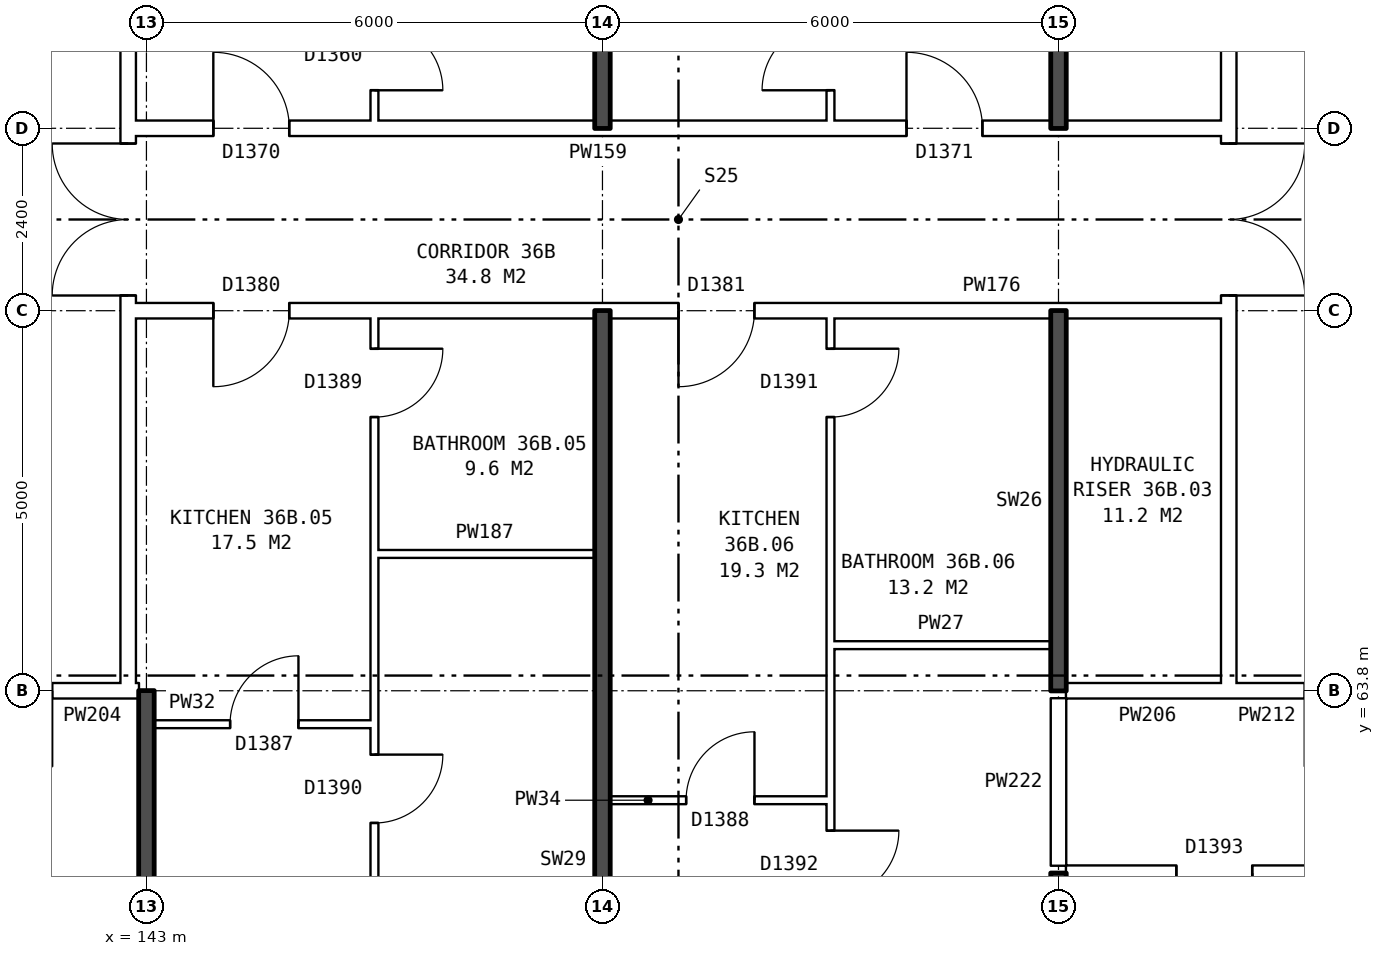
"""IFC4 building model, lengths in metres.
Left out: names, types, materials, properties, quantities, classifications, styles, units other than length and angle.
Written with IfcOpenShell. Run it as: python <this file> out.ifc"""

import sys

from ifc_helpers import new_model, si_unit, direction, frame, frame_2d, origin, place, context, subcontext, project, spatial, rectangle, extrude, element, fill, save


model = new_model("IFC4")
c1 = context("Model", 3, precision=1e-05, world=origin(), true_north=direction((0.0, 1.0)))
c2 = subcontext(c1, "Body", "Model", "MODEL_VIEW")
j1 = project(units=[si_unit("LENGTHUNIT", "METRE"), si_unit("PLANEANGLEUNIT", "RADIAN")], contexts=[c1])
p1 = place(None, origin())
s1 = spatial("IfcSite", under=j1, at=p1, CompositionType="ELEMENT")
p2 = place(p1, origin())
s2 = spatial("IfcBuilding", under=s1, at=p2, CompositionType="ELEMENT")
p3 = place(p2, frame((0.0, 0.0, 129.9)))
s3 = spatial("IfcBuildingStorey", under=s2, at=p3, CompositionType="ELEMENT", Elevation=129.9)
p4 = place(p3, frame((142.76, 63.9, 0.0), z_axis=(0.0, 0.0, 1.0), x_axis=(0.0, 1.0, 0.0)))
e1 = element("IfcWall", 1, at=p4, inside=s3, PredefinedType="PARTITIONING", context=c2, shape_type="SweptSolid", body=[
    extrude(rectangle(XDim=12.2, YDim=0.2, at=frame_2d((6.1, 0.0))), origin(), (0.0, 0.0, 1.0), 2.85),
])
p5 = place(p4, frame((5.1, 0.0, 0.0)))
e2 = element("IfcOpeningElement", 2, at=p5, cuts=e1, PredefinedType="OPENING", context=c2, shape_type="SweptSolid", body=[
    extrude(rectangle(XDim=2.0, YDim=2.1, at=frame_2d((1.0, 1.05))), frame((0.0, 0.11, 0.0), z_axis=(0.0, -1.0, 0.0), x_axis=(1.0, 0.0, 0.0)), (0.0, 0.0, 1.0), 0.22),
])
p6 = place(p3, frame((157.24, 63.9, 0.0), z_axis=(0.0, 0.0, 1.0), x_axis=(0.0, 1.0, 0.0)))
e3 = element("IfcWall", 3, at=p6, inside=s3, PredefinedType="PARTITIONING", context=c2, shape_type="SweptSolid", body=[
    extrude(rectangle(XDim=12.2, YDim=0.2, at=frame_2d((6.1, 0.0))), origin(), (0.0, 0.0, 1.0), 2.85),
])
p7 = place(p6, frame((5.1, 0.0, 0.0)))
e4 = element("IfcOpeningElement", 4, at=p7, cuts=e3, PredefinedType="OPENING", context=c2, shape_type="SweptSolid", body=[
    extrude(rectangle(XDim=2.0, YDim=2.1, at=frame_2d((1.0, 1.05))), frame((0.0, 0.11, 0.0), z_axis=(0.0, -1.0, 0.0), x_axis=(1.0, 0.0, 0.0)), (0.0, 0.0, 1.0), 0.22),
])
p8 = place(p3, frame((155.1, 61.4, 0.0), z_axis=(0.0, 0.0, 1.0), x_axis=(1.0, 0.0, 0.0)))
e5 = element("IfcWall", 5, at=p8, inside=s3, PredefinedType="PARTITIONING", context=c2, shape_type="SweptSolid", body=[
    extrude(rectangle(XDim=17.29, YDim=0.2, at=frame_2d((8.645, 0.0))), origin(), (0.0, 0.0, 1.0), 2.85),
])
p9 = place(p8, frame((1.45, 0.0, 0.0)))
e6 = element("IfcOpeningElement", 6, at=p9, cuts=e5, PredefinedType="OPENING", context=c2, shape_type="SweptSolid", body=[
    extrude(rectangle(XDim=1.0, YDim=2.1, at=frame_2d((0.5, 1.05))), frame((0.0, 0.11, 0.0), z_axis=(0.0, -1.0, 0.0), x_axis=(1.0, 0.0, 0.0)), (0.0, 0.0, 1.0), 0.22),
])
p10 = place(p8, frame((8.4, 0.0, 0.0)))
e7 = element("IfcOpeningElement", 7, at=p10, cuts=e5, PredefinedType="OPENING", context=c2, shape_type="SweptSolid", body=[
    extrude(rectangle(XDim=1.0, YDim=2.1, at=frame_2d((0.5, 1.05))), frame((0.0, 0.11, 0.0), z_axis=(0.0, -1.0, 0.0), x_axis=(1.0, 0.0, 0.0)), (0.0, 0.0, 1.0), 0.22),
])
p11 = place(p3, frame((149.1, 62.36, 0.0), z_axis=(0.0, 0.0, 1.0), x_axis=(1.0, 0.0, 0.0)))
e8 = element("IfcWall", 8, at=p11, inside=s3, PredefinedType="PARTITIONING", context=c2, shape_type="SweptSolid", body=[
    extrude(rectangle(XDim=2.9, YDim=0.1, at=frame_2d((1.45, 0.0))), origin(), (0.0, 0.0, 1.0), 2.85),
])
p12 = place(p11, frame((1.0, 0.0, 0.0)))
e9 = element("IfcOpeningElement", 9, at=p12, cuts=e8, PredefinedType="OPENING", context=c2, shape_type="SweptSolid", body=[
    extrude(rectangle(XDim=0.9, YDim=2.1, at=frame_2d((0.45, 1.05))), frame((0.0, 0.06, 0.0), z_axis=(0.0, -1.0, 0.0), x_axis=(1.0, 0.0, 0.0)), (0.0, 0.0, 1.0), 0.12),
])
p13 = place(p3, frame((143.1, 63.36, 0.0), z_axis=(0.0, 0.0, 1.0), x_axis=(1.0, 0.0, 0.0)))
e10 = element("IfcWall", 10, at=p13, inside=s3, PredefinedType="PARTITIONING", context=c2, shape_type="SweptSolid", body=[
    extrude(rectangle(XDim=2.9, YDim=0.1, at=frame_2d((1.45, 0.0))), origin(), (0.0, 0.0, 1.0), 2.85),
])
p14 = place(p13, frame((1.0, 0.0, 0.0)))
e11 = element("IfcOpeningElement", 11, at=p14, cuts=e10, PredefinedType="OPENING", context=c2, shape_type="SweptSolid", body=[
    extrude(rectangle(XDim=0.9, YDim=2.1, at=frame_2d((0.45, 1.05))), frame((0.0, 0.06, 0.0), z_axis=(0.0, -1.0, 0.0), x_axis=(1.0, 0.0, 0.0)), (0.0, 0.0, 1.0), 0.12),
])
p15 = place(p3, frame((139.76, 63.8, 0.0), z_axis=(0.0, 0.0, 1.0), x_axis=(1.0, 0.0, 0.0)))
e12 = element("IfcWall", 12, at=p15, inside=s3, PredefinedType="PARTITIONING", context=c2, shape_type="SweptSolid", body=[
    extrude(rectangle(XDim=3.0, YDim=0.2, at=frame_2d((1.5, 0.0))), origin(), (0.0, 0.0, 1.0), 2.85),
])
p16 = place(p15, frame((1.0, 0.0, 0.0)))
e13 = element("IfcOpeningElement", 13, at=p16, cuts=e12, PredefinedType="OPENING", context=c2, shape_type="SweptSolid", body=[
    extrude(rectangle(XDim=1.0, YDim=2.1, at=frame_2d((0.5, 1.05))), frame((0.0, 0.11, 0.0), z_axis=(0.0, -1.0, 0.0), x_axis=(1.0, 0.0, 0.0)), (0.0, 0.0, 1.0), 0.22),
])
p17 = place(p3, frame((142.76, 63.8, 0.0), z_axis=(0.0, 0.0, 1.0), x_axis=(1.0, 0.0, 0.0)))
e14 = element("IfcWall", 14, at=p17, inside=s3, PredefinedType="PARTITIONING", context=c2, shape_type="SweptSolid", body=[
    extrude(rectangle(XDim=0.14, YDim=0.2, at=frame_2d((0.07, 0.0))), origin(), (0.0, 0.0, 1.0), 2.85),
])
p18 = place(p3, frame((155.1, 63.8, 0.0), z_axis=(0.0, 0.0, 1.0), x_axis=(1.0, 0.0, 0.0)))
e15 = element("IfcWall", 15, at=p18, inside=s3, PredefinedType="PARTITIONING", context=c2, shape_type="SweptSolid", body=[
    extrude(rectangle(XDim=2.14, YDim=0.2, at=frame_2d((1.07, 0.0))), origin(), (0.0, 0.0, 1.0), 2.85),
])
p19 = place(p3, frame((157.24, 63.8, 0.0), z_axis=(0.0, 0.0, 1.0), x_axis=(1.0, 0.0, 0.0)))
e16 = element("IfcWall", 16, at=p19, inside=s3, PredefinedType="PARTITIONING", context=c2, shape_type="SweptSolid", body=[
    extrude(rectangle(XDim=3.0, YDim=0.2, at=frame_2d((1.5, 0.0))), origin(), (0.0, 0.0, 1.0), 2.85),
])
p20 = place(p19, frame((1.0, 0.0, 0.0)))
e17 = element("IfcOpeningElement", 17, at=p20, cuts=e16, PredefinedType="OPENING", context=c2, shape_type="SweptSolid", body=[
    extrude(rectangle(XDim=1.0, YDim=2.1, at=frame_2d((0.5, 1.05))), frame((0.0, 0.11, 0.0), z_axis=(0.0, -1.0, 0.0), x_axis=(1.0, 0.0, 0.0)), (0.0, 0.0, 1.0), 0.22),
])
for number, where, z_axis, x_axis in (
    (18, (152.0, 64.4, 0.0), (0.0, 0.0, 1.0), (1.0, 0.0, 0.0)),
    (19, (146.0, 65.6, 0.0), (0.0, 0.0, 1.0), (1.0, 0.0, 0.0)),
):
    element("IfcWall", number, at=place(p3, frame(where, z_axis=z_axis, x_axis=x_axis)), inside=s3, PredefinedType="PARTITIONING", context=c2, shape_type="SweptSolid", body=[
        extrude(rectangle(XDim=2.9, YDim=0.1, at=frame_2d((1.45, 0.0))), origin(), (0.0, 0.0, 1.0), 2.85),
    ])
p21 = place(p3, frame((142.76, 68.8, 0.0), z_axis=(0.0, 0.0, 1.0), x_axis=(1.0, 0.0, 0.0)))
e20 = element("IfcWall", 20, at=p21, inside=s3, PredefinedType="PARTITIONING", context=c2, shape_type="SweptSolid", body=[
    extrude(rectangle(XDim=14.48, YDim=0.2, at=frame_2d((7.24, 0.0))), origin(), (0.0, 0.0, 1.0), 2.85),
])
p22 = place(p21, frame((1.12, 0.0, 0.0)))
e21 = element("IfcOpeningElement", 21, at=p22, cuts=e20, PredefinedType="OPENING", context=c2, shape_type="SweptSolid", body=[
    extrude(rectangle(XDim=1.0, YDim=2.1, at=frame_2d((0.5, 1.05))), frame((0.0, 0.11, 0.0), z_axis=(0.0, -1.0, 0.0), x_axis=(1.0, 0.0, 0.0)), (0.0, 0.0, 1.0), 0.22),
])
p23 = place(p21, frame((7.24, 0.0, 0.0)))
e22 = element("IfcOpeningElement", 22, at=p23, cuts=e20, PredefinedType="OPENING", context=c2, shape_type="SweptSolid", body=[
    extrude(rectangle(XDim=1.0, YDim=2.1, at=frame_2d((0.5, 1.05))), frame((0.0, 0.11, 0.0), z_axis=(0.0, -1.0, 0.0), x_axis=(1.0, 0.0, 0.0)), (0.0, 0.0, 1.0), 0.22),
])
p24 = place(p3, frame((142.76, 71.2, 0.0), z_axis=(0.0, 0.0, 1.0), x_axis=(1.0, 0.0, 0.0)))
e23 = element("IfcWall", 23, at=p24, inside=s3, PredefinedType="PARTITIONING", context=c2, shape_type="SweptSolid", body=[
    extrude(rectangle(XDim=14.48, YDim=0.2, at=frame_2d((7.24, 0.0))), origin(), (0.0, 0.0, 1.0), 2.85),
])
p25 = place(p24, frame((1.12, 0.0, 0.0)))
e24 = element("IfcOpeningElement", 24, at=p25, cuts=e23, PredefinedType="OPENING", context=c2, shape_type="SweptSolid", body=[
    extrude(rectangle(XDim=1.0, YDim=2.1, at=frame_2d((0.5, 1.05))), frame((0.0, 0.11, 0.0), z_axis=(0.0, -1.0, 0.0), x_axis=(1.0, 0.0, 0.0)), (0.0, 0.0, 1.0), 0.22),
])
p26 = place(p24, frame((10.24, 0.0, 0.0)))
e25 = element("IfcOpeningElement", 25, at=p26, cuts=e23, PredefinedType="OPENING", context=c2, shape_type="SweptSolid", body=[
    extrude(rectangle(XDim=1.0, YDim=2.1, at=frame_2d((0.5, 1.05))), frame((0.0, 0.11, 0.0), z_axis=(0.0, -1.0, 0.0), x_axis=(1.0, 0.0, 0.0)), (0.0, 0.0, 1.0), 0.22),
])
p27 = place(p3, frame((143.0, 54.36, 0.0), z_axis=(0.0, 0.0, 1.0), x_axis=(0.0, 1.0, 0.0)))
e26 = element("IfcWall", 26, at=p27, inside=s3, PredefinedType="SOLIDWALL", context=c2, shape_type="SweptSolid", body=[
    extrude(rectangle(XDim=9.44, YDim=0.2, at=frame_2d((4.72, 0.0))), origin(), (0.0, 0.0, 1.0), 2.85),
])
p28 = place(p3, frame((146.0, 54.36, 0.0), z_axis=(0.0, 0.0, 1.0), x_axis=(0.0, 1.0, 0.0)))
e27 = element("IfcWall", 27, at=p28, inside=s3, PredefinedType="PARTITIONING", context=c2, shape_type="SweptSolid", body=[
    extrude(rectangle(XDim=14.34, YDim=0.1, at=frame_2d((7.17, 0.0))), origin(), (0.0, 0.0, 1.0), 2.85),
])
p29 = place(p28, frame((7.7, 0.0, 0.0)))
e28 = element("IfcOpeningElement", 28, at=p29, cuts=e27, PredefinedType="OPENING", context=c2, shape_type="SweptSolid", body=[
    extrude(rectangle(XDim=0.9, YDim=2.1, at=frame_2d((0.45, 1.05))), frame((0.0, 0.06, 0.0), z_axis=(0.0, -1.0, 0.0), x_axis=(1.0, 0.0, 0.0)), (0.0, 0.0, 1.0), 0.12),
])
p30 = place(p28, frame((13.04, 0.0, 0.0)))
e29 = element("IfcOpeningElement", 29, at=p30, cuts=e27, PredefinedType="OPENING", context=c2, shape_type="SweptSolid", body=[
    extrude(rectangle(XDim=0.9, YDim=2.1, at=frame_2d((0.45, 1.05))), frame((0.0, 0.06, 0.0), z_axis=(0.0, -1.0, 0.0), x_axis=(1.0, 0.0, 0.0)), (0.0, 0.0, 1.0), 0.12),
])
p31 = place(p3, frame((146.0, 71.3, 0.0), z_axis=(0.0, 0.0, 1.0), x_axis=(0.0, 1.0, 0.0)))
e30 = element("IfcWall", 30, at=p31, inside=s3, PredefinedType="PARTITIONING", context=c2, shape_type="SweptSolid", body=[
    extrude(rectangle(XDim=14.34, YDim=0.1, at=frame_2d((7.17, 0.0))), origin(), (0.0, 0.0, 1.0), 2.85),
])
p32 = place(p31, frame((6.74, 0.0, 0.0)))
e31 = element("IfcOpeningElement", 31, at=p32, cuts=e30, PredefinedType="OPENING", context=c2, shape_type="SweptSolid", body=[
    extrude(rectangle(XDim=0.9, YDim=2.1, at=frame_2d((0.45, 1.05))), frame((0.0, 0.06, 0.0), z_axis=(0.0, -1.0, 0.0), x_axis=(1.0, 0.0, 0.0)), (0.0, 0.0, 1.0), 0.12),
])
p33 = place(p31, frame((0.4, 0.0, 0.0)))
e32 = element("IfcOpeningElement", 32, at=p33, cuts=e30, PredefinedType="OPENING", context=c2, shape_type="SweptSolid", body=[
    extrude(rectangle(XDim=0.9, YDim=2.1, at=frame_2d((0.45, 1.05))), frame((0.0, 0.06, 0.0), z_axis=(0.0, -1.0, 0.0), x_axis=(1.0, 0.0, 0.0)), (0.0, 0.0, 1.0), 0.12),
])
for number, where, z_axis, x_axis in (
    (33, (149.0, 54.36, 0.0), (0.0, 0.0, 1.0), (0.0, 1.0, 0.0)),
    (34, (149.0, 71.2, 0.0), (0.0, 0.0, 1.0), (0.0, 1.0, 0.0)),
):
    element("IfcWall", number, at=place(p3, frame(where, z_axis=z_axis, x_axis=x_axis)), inside=s3, PredefinedType="SOLIDWALL", context=c2, shape_type="SweptSolid", body=[
        extrude(rectangle(XDim=14.44, YDim=0.2, at=frame_2d((7.22, 0.0))), origin(), (0.0, 0.0, 1.0), 2.85),
    ])
p34 = place(p3, frame((152.0, 54.36, 0.0), z_axis=(0.0, 0.0, 1.0), x_axis=(0.0, 1.0, 0.0)))
e35 = element("IfcWall", 35, at=p34, inside=s3, PredefinedType="PARTITIONING", context=c2, shape_type="SweptSolid", body=[
    extrude(rectangle(XDim=14.34, YDim=0.1, at=frame_2d((7.17, 0.0))), origin(), (0.0, 0.0, 1.0), 2.85),
])
p35 = place(p34, frame((6.7, 0.0, 0.0)))
e36 = element("IfcOpeningElement", 36, at=p35, cuts=e35, PredefinedType="OPENING", context=c2, shape_type="SweptSolid", body=[
    extrude(rectangle(XDim=0.9, YDim=2.1, at=frame_2d((0.45, 1.05))), frame((0.0, 0.06, 0.0), z_axis=(0.0, -1.0, 0.0), x_axis=(1.0, 0.0, 0.0)), (0.0, 0.0, 1.0), 0.12),
])
p36 = place(p34, frame((13.04, 0.0, 0.0)))
e37 = element("IfcOpeningElement", 37, at=p36, cuts=e35, PredefinedType="OPENING", context=c2, shape_type="SweptSolid", body=[
    extrude(rectangle(XDim=0.9, YDim=2.1, at=frame_2d((0.45, 1.05))), frame((0.0, 0.06, 0.0), z_axis=(0.0, -1.0, 0.0), x_axis=(1.0, 0.0, 0.0)), (0.0, 0.0, 1.0), 0.12),
])
p37 = place(p3, frame((152.0, 71.3, 0.0), z_axis=(0.0, 0.0, 1.0), x_axis=(0.0, 1.0, 0.0)))
e38 = element("IfcWall", 38, at=p37, inside=s3, PredefinedType="PARTITIONING", context=c2, shape_type="SweptSolid", body=[
    extrude(rectangle(XDim=14.34, YDim=0.1, at=frame_2d((7.17, 0.0))), origin(), (0.0, 0.0, 1.0), 2.85),
])
p38 = place(p37, frame((6.74, 0.0, 0.0)))
e39 = element("IfcOpeningElement", 39, at=p38, cuts=e38, PredefinedType="OPENING", context=c2, shape_type="SweptSolid", body=[
    extrude(rectangle(XDim=0.9, YDim=2.1, at=frame_2d((0.45, 1.05))), frame((0.0, 0.06, 0.0), z_axis=(0.0, -1.0, 0.0), x_axis=(1.0, 0.0, 0.0)), (0.0, 0.0, 1.0), 0.12),
])
p39 = place(p37, frame((0.4, 0.0, 0.0)))
e40 = element("IfcOpeningElement", 40, at=p39, cuts=e38, PredefinedType="OPENING", context=c2, shape_type="SweptSolid", body=[
    extrude(rectangle(XDim=0.9, YDim=2.1, at=frame_2d((0.45, 1.05))), frame((0.0, 0.06, 0.0), z_axis=(0.0, -1.0, 0.0), x_axis=(1.0, 0.0, 0.0)), (0.0, 0.0, 1.0), 0.12),
])
p40 = place(p3, frame((155.0, 54.36, 0.0), z_axis=(0.0, 0.0, 1.0), x_axis=(0.0, 1.0, 0.0)))
e41 = element("IfcWall", 41, at=p40, inside=s3, PredefinedType="SOLIDWALL", context=c2, shape_type="SweptSolid", body=[
    extrude(rectangle(XDim=7.04, YDim=0.2, at=frame_2d((3.52, 0.0))), origin(), (0.0, 0.0, 1.0), 2.85),
])
p41 = place(p3, frame((155.0, 61.5, 0.0), z_axis=(0.0, 0.0, 1.0), x_axis=(0.0, 1.0, 0.0)))
e42 = element("IfcWall", 42, at=p41, inside=s3, PredefinedType="PARTITIONING", context=c2, shape_type="SweptSolid", body=[
    extrude(rectangle(XDim=2.2, YDim=0.2, at=frame_2d((1.1, 0.0))), origin(), (0.0, 0.0, 1.0), 2.85),
])
for number, where, z_axis, x_axis in (
    (43, (155.0, 63.8, 0.0), (0.0, 0.0, 1.0), (0.0, 1.0, 0.0)),
    (44, (155.0, 71.2, 0.0), (0.0, 0.0, 1.0), (0.0, 1.0, 0.0)),
):
    element("IfcWall", number, at=place(p3, frame(where, z_axis=z_axis, x_axis=x_axis)), inside=s3, PredefinedType="SOLIDWALL", context=c2, shape_type="SweptSolid", body=[
        extrude(rectangle(XDim=5.0, YDim=0.2, at=frame_2d((2.5, 0.0))), origin(), (0.0, 0.0, 1.0), 2.85),
    ])
p42 = place(p5, origin())
e45 = element("IfcDoor", 45, at=p42, inside=s3, OperationType="DOUBLE_DOOR_SINGLE_SWING", PredefinedType="DOOR", context=c2, shape_type="SweptSolid", body=[
    extrude(rectangle(XDim=2.0, YDim=2.1, at=frame_2d((1.0, 1.05))), frame((0.0, 0.025, 0.0), z_axis=(0.0, -1.0, 0.0), x_axis=(1.0, 0.0, 0.0)), (0.0, 0.0, 1.0), 0.05),
])
fill(e2, e45)
p43 = place(p7, frame((2.0, 0.0, 0.0), z_axis=(0.0, 0.0, 1.0), x_axis=(-1.0, 0.0, 0.0)))
e46 = element("IfcDoor", 46, at=p43, inside=s3, OperationType="DOUBLE_DOOR_SINGLE_SWING", PredefinedType="DOOR", context=c2, shape_type="SweptSolid", body=[
    extrude(rectangle(XDim=2.0, YDim=2.1, at=frame_2d((1.0, 1.05))), frame((0.0, 0.025, 0.0), z_axis=(0.0, -1.0, 0.0), x_axis=(1.0, 0.0, 0.0)), (0.0, 0.0, 1.0), 0.05),
])
fill(e4, e46)
p44 = place(p29, frame((0.9, 0.0, 0.0), z_axis=(0.0, 0.0, 1.0), x_axis=(-1.0, 0.0, 0.0)))
e47 = element("IfcDoor", 47, at=p44, inside=s3, OperationType="SINGLE_SWING_LEFT", PredefinedType="DOOR", context=c2, shape_type="SweptSolid", body=[
    extrude(rectangle(XDim=0.9, YDim=2.1, at=frame_2d((0.45, 1.05))), frame((0.0, 0.025, 0.0), z_axis=(0.0, -1.0, 0.0), x_axis=(1.0, 0.0, 0.0)), (0.0, 0.0, 1.0), 0.05),
])
fill(e28, e47)
p45 = place(p22, frame((1.0, 0.0, 0.0), z_axis=(0.0, 0.0, 1.0), x_axis=(-1.0, 0.0, 0.0)))
e48 = element("IfcDoor", 48, at=p45, inside=s3, OperationType="SINGLE_SWING_RIGHT", PredefinedType="DOOR", context=c2, shape_type="SweptSolid", body=[
    extrude(rectangle(XDim=1.0, YDim=2.1, at=frame_2d((0.5, 1.05))), frame((0.0, 0.025, 0.0), z_axis=(0.0, -1.0, 0.0), x_axis=(1.0, 0.0, 0.0)), (0.0, 0.0, 1.0), 0.05),
])
fill(e21, e48)
p46 = place(p14, origin())
e49 = element("IfcDoor", 49, at=p46, inside=s3, OperationType="SINGLE_SWING_RIGHT", PredefinedType="DOOR", context=c2, shape_type="SweptSolid", body=[
    extrude(rectangle(XDim=0.9, YDim=2.1, at=frame_2d((0.45, 1.05))), frame((0.0, 0.025, 0.0), z_axis=(0.0, -1.0, 0.0), x_axis=(1.0, 0.0, 0.0)), (0.0, 0.0, 1.0), 0.05),
])
fill(e11, e49)
p47 = place(p30, frame((0.9, 0.0, 0.0), z_axis=(0.0, 0.0, 1.0), x_axis=(-1.0, 0.0, 0.0)))
e50 = element("IfcDoor", 50, at=p47, inside=s3, OperationType="SINGLE_SWING_LEFT", PredefinedType="DOOR", context=c2, shape_type="SweptSolid", body=[
    extrude(rectangle(XDim=0.9, YDim=2.1, at=frame_2d((0.45, 1.05))), frame((0.0, 0.025, 0.0), z_axis=(0.0, -1.0, 0.0), x_axis=(1.0, 0.0, 0.0)), (0.0, 0.0, 1.0), 0.05),
])
fill(e29, e50)
p48 = place(p35, frame((0.9, 0.0, 0.0), z_axis=(0.0, 0.0, 1.0), x_axis=(-1.0, 0.0, 0.0)))
e51 = element("IfcDoor", 51, at=p48, inside=s3, OperationType="SINGLE_SWING_LEFT", PredefinedType="DOOR", context=c2, shape_type="SweptSolid", body=[
    extrude(rectangle(XDim=0.9, YDim=2.1, at=frame_2d((0.45, 1.05))), frame((0.0, 0.025, 0.0), z_axis=(0.0, -1.0, 0.0), x_axis=(1.0, 0.0, 0.0)), (0.0, 0.0, 1.0), 0.05),
])
fill(e36, e51)
p49 = place(p23, frame((1.0, 0.0, 0.0), z_axis=(0.0, 0.0, 1.0), x_axis=(-1.0, 0.0, 0.0)))
e52 = element("IfcDoor", 52, at=p49, inside=s3, OperationType="SINGLE_SWING_RIGHT", PredefinedType="DOOR", context=c2, shape_type="SweptSolid", body=[
    extrude(rectangle(XDim=1.0, YDim=2.1, at=frame_2d((0.5, 1.05))), frame((0.0, 0.025, 0.0), z_axis=(0.0, -1.0, 0.0), x_axis=(1.0, 0.0, 0.0)), (0.0, 0.0, 1.0), 0.05),
])
fill(e22, e52)
p50 = place(p12, origin())
e53 = element("IfcDoor", 53, at=p50, inside=s3, OperationType="SINGLE_SWING_RIGHT", PredefinedType="DOOR", context=c2, shape_type="SweptSolid", body=[
    extrude(rectangle(XDim=0.9, YDim=2.1, at=frame_2d((0.45, 1.05))), frame((0.0, 0.025, 0.0), z_axis=(0.0, -1.0, 0.0), x_axis=(1.0, 0.0, 0.0)), (0.0, 0.0, 1.0), 0.05),
])
fill(e9, e53)
p51 = place(p36, frame((0.9, 0.0, 0.0), z_axis=(0.0, 0.0, 1.0), x_axis=(-1.0, 0.0, 0.0)))
e54 = element("IfcDoor", 54, at=p51, inside=s3, OperationType="SINGLE_SWING_LEFT", PredefinedType="DOOR", context=c2, shape_type="SweptSolid", body=[
    extrude(rectangle(XDim=0.9, YDim=2.1, at=frame_2d((0.45, 1.05))), frame((0.0, 0.025, 0.0), z_axis=(0.0, -1.0, 0.0), x_axis=(1.0, 0.0, 0.0)), (0.0, 0.0, 1.0), 0.05),
])
fill(e37, e54)
p52 = place(p25, origin())
e55 = element("IfcDoor", 55, at=p52, inside=s3, OperationType="SINGLE_SWING_LEFT", PredefinedType="DOOR", context=c2, shape_type="SweptSolid", body=[
    extrude(rectangle(XDim=1.0, YDim=2.1, at=frame_2d((0.5, 1.05))), frame((0.0, 0.025, 0.0), z_axis=(0.0, -1.0, 0.0), x_axis=(1.0, 0.0, 0.0)), (0.0, 0.0, 1.0), 0.05),
])
fill(e24, e55)
p53 = place(p33, frame((0.9, 0.0, 0.0), z_axis=(0.0, 0.0, 1.0), x_axis=(-1.0, 0.0, 0.0)))
e56 = element("IfcDoor", 56, at=p53, inside=s3, OperationType="SINGLE_SWING_RIGHT", PredefinedType="DOOR", context=c2, shape_type="SweptSolid", body=[
    extrude(rectangle(XDim=0.9, YDim=2.1, at=frame_2d((0.45, 1.05))), frame((0.0, 0.025, 0.0), z_axis=(0.0, -1.0, 0.0), x_axis=(1.0, 0.0, 0.0)), (0.0, 0.0, 1.0), 0.05),
])
fill(e32, e56)
p54 = place(p26, origin())
e57 = element("IfcDoor", 57, at=p54, inside=s3, OperationType="SINGLE_SWING_LEFT", PredefinedType="DOOR", context=c2, shape_type="SweptSolid", body=[
    extrude(rectangle(XDim=1.0, YDim=2.1, at=frame_2d((0.5, 1.05))), frame((0.0, 0.025, 0.0), z_axis=(0.0, -1.0, 0.0), x_axis=(1.0, 0.0, 0.0)), (0.0, 0.0, 1.0), 0.05),
])
fill(e25, e57)
p55 = place(p39, origin())
e58 = element("IfcDoor", 58, at=p55, inside=s3, OperationType="SINGLE_SWING_LEFT", PredefinedType="DOOR", context=c2, shape_type="SweptSolid", body=[
    extrude(rectangle(XDim=0.9, YDim=2.1, at=frame_2d((0.45, 1.05))), frame((0.0, 0.025, 0.0), z_axis=(0.0, -1.0, 0.0), x_axis=(1.0, 0.0, 0.0)), (0.0, 0.0, 1.0), 0.05),
])
fill(e40, e58)
p56 = place(p9, frame((1.0, 0.0, 0.0), z_axis=(0.0, 0.0, 1.0), x_axis=(-1.0, 0.0, 0.0)))
e59 = element("IfcDoor", 59, at=p56, inside=s3, OperationType="SINGLE_SWING_LEFT", PredefinedType="DOOR", context=c2, shape_type="SweptSolid", body=[
    extrude(rectangle(XDim=1.0, YDim=2.1, at=frame_2d((0.5, 1.05))), frame((0.0, 0.025, 0.0), z_axis=(0.0, -1.0, 0.0), x_axis=(1.0, 0.0, 0.0)), (0.0, 0.0, 1.0), 0.05),
])
fill(e6, e59)
save(model, sys.argv[1])
